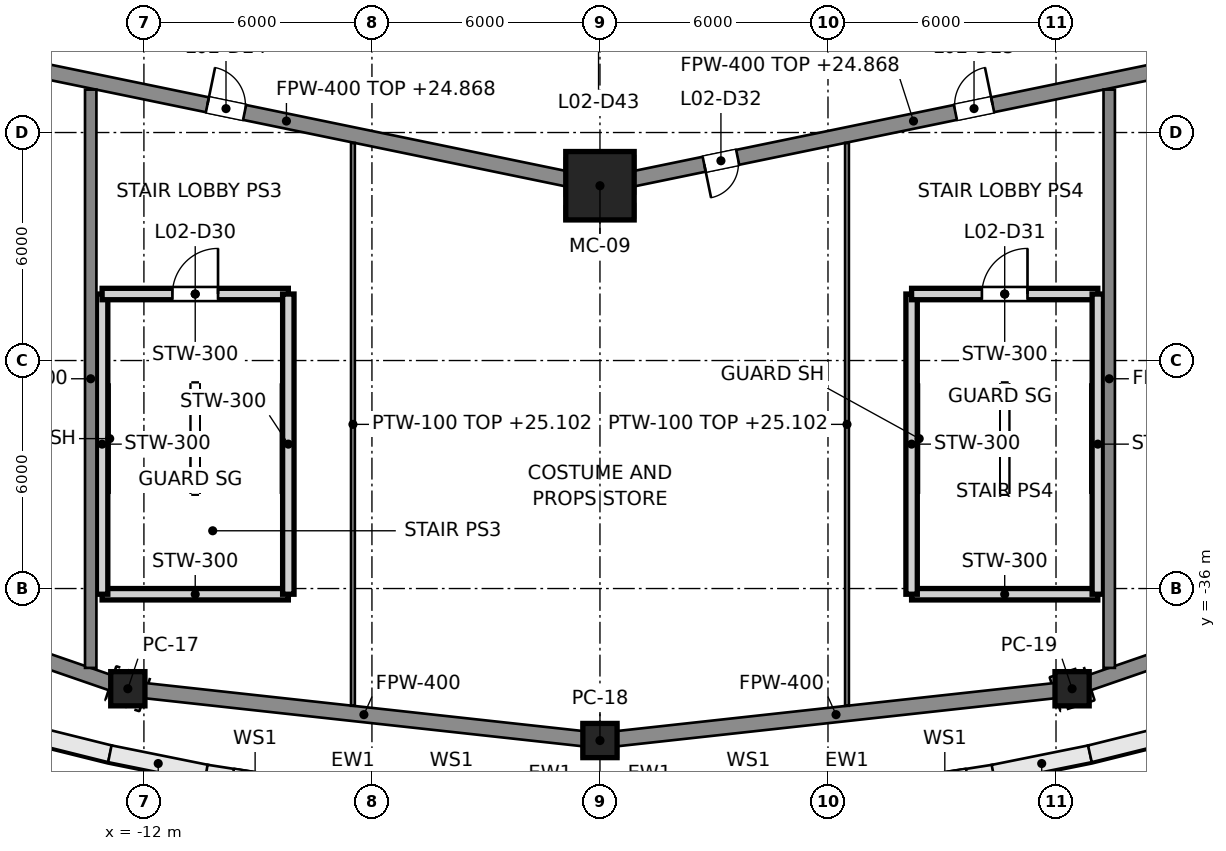
"""IFC4 building model, lengths in metres.
Left out: names, types, materials, properties, quantities, classifications, styles, units other than length and angle.
Written with IfcOpenShell. Run it as: python <this file> out.ifc"""

import sys

from ifc_helpers import new_model, si_unit, direction, frame, frame_2d, origin, origin_2d, place, context, subcontext, project, spatial, polyline, rectangle, hollow_rectangle, outline, extrude, element, fill, save


model = new_model("IFC4")
c1 = context("Model", 3, precision=1e-05, world=origin(), true_north=direction((0.0, 1.0)))
c2 = subcontext(c1, "Body", "Model", "MODEL_VIEW")
j1 = project(units=[si_unit("LENGTHUNIT", "METRE"), si_unit("PLANEANGLEUNIT", "RADIAN")], contexts=[c1])
p1 = place(None, origin())
s1 = spatial("IfcSite", under=j1, at=p1, CompositionType="ELEMENT")
p2 = place(p1, origin())
s2 = spatial("IfcBuilding", under=s1, at=p2, CompositionType="ELEMENT")
p3 = place(p2, frame((0.0, 0.0, 17.0)))
s3 = spatial("IfcBuildingStorey", under=s2, at=p3, CompositionType="ELEMENT", Elevation=17.0)
p4 = place(p3, frame((0.0, -25.4, 0.0), z_axis=(0.0, 0.0, 1.0), x_axis=(0.0, -1.0, 0.0)))
e1 = element("IfcColumn", 1, at=p4, inside=s3, PredefinedType="COLUMN", context=c2, shape_type="SweptSolid", body=[
    extrude(hollow_rectangle(XDim=1.8, YDim=1.8, WallThickness=0.08, at=origin_2d()), origin(), (0.0, 0.0, 1.0), 9.0),
])
for number, where, z_axis, x_axis in (
    (2, (-12.423, -38.637, 0.0), (0.0, 0.0, 1.0), (-0.306, -0.952, 0.0)),
    (3, (0.0, -40.0, 0.0), (0.0, 0.0, 1.0), (0.0, -1.0, 0.0)),
    (4, (12.423, -38.637, 0.0), (0.0, 0.0, 1.0), (0.306, -0.952, 0.0)),
):
    element("IfcColumn", number, at=place(p3, frame(where, z_axis=z_axis, x_axis=x_axis)), inside=s3, PredefinedType="COLUMN", context=c2, shape_type="SweptSolid", body=[
        extrude(hollow_rectangle(XDim=0.9, YDim=0.9, WallThickness=0.04, at=origin_2d()), origin(), (0.0, 0.0, 1.0), 9.0),
    ])
p5 = place(p3, origin())
e5 = element("IfcWall", 5, at=p5, inside=s3, PredefinedType="SOLIDWALL", context=c2, shape_type="SweptSolid", body=[
    extrude(outline(polyline([(-25.0, -36.373), (-22.699, -37.422), (-20.337, -38.369), (-17.918, -39.21), (-15.451, -39.944), (-12.941, -40.569), (-12.842, -40.13), (-15.332, -39.51), (-17.78, -38.782), (-20.179, -37.948), (-22.522, -37.009), (-24.804, -35.968), (-25.0, -36.373)])), origin(), (0.0, 0.0, 1.0), 8.8),
])
p6 = place(p3, frame((-12.896, -40.348, 0.0), z_axis=(0.0, 0.0, 1.0), x_axis=(0.980275735323, -0.197634720473, 0.0)))
e6 = element("IfcWall", 6, at=p6, inside=s3, PredefinedType="SOLIDWALL", context=c2, shape_type="SweptSolid", body=[
    extrude(rectangle(XDim=2.597, YDim=0.45, at=frame_2d((1.298, 0.0))), origin(), (0.0, 0.0, 1.0), 8.8),
])
p7 = place(p3, frame((-10.361, -40.86, 0.0), z_axis=(0.0, 0.0, 1.0), x_axis=(0.98810254681, -0.153796479115, 0.0)))
e7 = element("IfcWall", 7, at=p7, inside=s3, PredefinedType="SOLIDWALL", context=c2, shape_type="SweptSolid", body=[
    extrude(rectangle(XDim=2.605, YDim=0.45, at=frame_2d((1.302, 0.0))), origin(), (0.0, 0.0, 1.0), 8.8),
])
p8 = place(p7, frame((0.702, 0.0, 1.0)))
e8 = element("IfcOpeningElement", 8, at=p8, cuts=e7, PredefinedType="OPENING", context=c2, shape_type="SweptSolid", body=[
    extrude(rectangle(XDim=1.2, YDim=1.8, at=frame_2d((0.6, 0.9))), frame((0.0, 0.225, 0.0), z_axis=(0.0, -1.0, 0.0), x_axis=(1.0, 0.0, 0.0)), (0.0, 0.0, 1.0), 0.45),
])
p9 = place(p3, frame((7.787, -41.26, 0.0), z_axis=(0.0, 0.0, 1.0), x_axis=(0.98810254681, 0.153796479115, 0.0)))
e9 = element("IfcWall", 9, at=p9, inside=s3, PredefinedType="SOLIDWALL", context=c2, shape_type="SweptSolid", body=[
    extrude(rectangle(XDim=2.605, YDim=0.45, at=frame_2d((1.302, 0.0))), origin(), (0.0, 0.0, 1.0), 8.8),
])
p10 = place(p9, frame((0.702, 0.0, 1.0)))
e10 = element("IfcOpeningElement", 10, at=p10, cuts=e9, PredefinedType="OPENING", context=c2, shape_type="SweptSolid", body=[
    extrude(rectangle(XDim=1.2, YDim=1.8, at=frame_2d((0.6, 0.9))), frame((0.0, 0.225, 0.0), z_axis=(0.0, -1.0, 0.0), x_axis=(1.0, 0.0, 0.0)), (0.0, 0.0, 1.0), 0.45),
])
p11 = place(p3, frame((10.351, -40.862, 0.0), z_axis=(0.0, 0.0, 1.0), x_axis=(0.980275735323, 0.197634720473, 0.0)))
e11 = element("IfcWall", 11, at=p11, inside=s3, PredefinedType="SOLIDWALL", context=c2, shape_type="SweptSolid", body=[
    extrude(rectangle(XDim=2.597, YDim=0.45, at=frame_2d((1.298, 0.0))), origin(), (0.0, 0.0, 1.0), 8.8),
])
e12 = element("IfcWall", 12, at=p5, inside=s3, PredefinedType="SOLIDWALL", context=c2, shape_type="SweptSolid", body=[
    extrude(outline(polyline([(12.941, -40.569), (15.451, -39.944), (17.918, -39.21), (20.337, -38.369), (22.699, -37.422), (25.0, -36.373), (24.804, -35.968), (22.522, -37.009), (20.179, -37.948), (17.78, -38.782), (15.332, -39.51), (12.842, -40.13), (12.941, -40.569)])), origin(), (0.0, 0.0, 1.0), 8.8),
])
p12 = place(p3, frame((-8.2, -36.15, 0.0), z_axis=(0.0, 0.0, 1.0), x_axis=(-1.0, 0.0, 0.0)))
e13 = element("IfcWall", 13, at=p12, inside=s3, PredefinedType="SOLIDWALL", context=c2, shape_type="SweptSolid", body=[
    extrude(rectangle(XDim=4.9, YDim=0.3, at=frame_2d((2.45, 0.0))), origin(), (0.0, 0.0, 1.0), 8.8),
])
p13 = place(p3, frame((-13.1, -36.15, 0.0), z_axis=(0.0, 0.0, 1.0), x_axis=(0.0, 1.0, 0.0)))
e14 = element("IfcWall", 14, at=p13, inside=s3, PredefinedType="SOLIDWALL", context=c2, shape_type="SweptSolid", body=[
    extrude(rectangle(XDim=7.9, YDim=0.3, at=frame_2d((3.95, 0.0))), origin(), (0.0, 0.0, 1.0), 8.8),
])
p14 = place(p3, frame((-13.1, -28.25, 0.0), z_axis=(0.0, 0.0, 1.0), x_axis=(1.0, 0.0, 0.0)))
e15 = element("IfcWall", 15, at=p14, inside=s3, PredefinedType="SOLIDWALL", context=c2, shape_type="SweptSolid", body=[
    extrude(rectangle(XDim=4.9, YDim=0.3, at=frame_2d((2.45, 0.0))), origin(), (0.0, 0.0, 1.0), 8.8),
])
p15 = place(p14, frame((1.85, 0.0, 0.0)))
e16 = element("IfcOpeningElement", 16, at=p15, cuts=e15, PredefinedType="OPENING", context=c2, shape_type="SweptSolid", body=[
    extrude(rectangle(XDim=1.2, YDim=2.1, at=frame_2d((0.6, 1.05))), frame((0.0, 0.15, 0.0), z_axis=(0.0, -1.0, 0.0), x_axis=(1.0, 0.0, 0.0)), (0.0, 0.0, 1.0), 0.3),
])
p16 = place(p3, frame((-8.2, -28.25, 0.0), z_axis=(0.0, 0.0, 1.0), x_axis=(0.0, -1.0, 0.0)))
e17 = element("IfcWall", 17, at=p16, inside=s3, PredefinedType="SOLIDWALL", context=c2, shape_type="SweptSolid", body=[
    extrude(rectangle(XDim=7.9, YDim=0.3, at=frame_2d((3.95, 0.0))), origin(), (0.0, 0.0, 1.0), 8.8),
])
p17 = place(p3, frame((13.1, -36.15, 0.0), z_axis=(0.0, 0.0, 1.0), x_axis=(-1.0, 0.0, 0.0)))
e18 = element("IfcWall", 18, at=p17, inside=s3, PredefinedType="SOLIDWALL", context=c2, shape_type="SweptSolid", body=[
    extrude(rectangle(XDim=4.9, YDim=0.3, at=frame_2d((2.45, 0.0))), origin(), (0.0, 0.0, 1.0), 8.8),
])
p18 = place(p3, frame((8.2, -36.15, 0.0), z_axis=(0.0, 0.0, 1.0), x_axis=(0.0, 1.0, 0.0)))
e19 = element("IfcWall", 19, at=p18, inside=s3, PredefinedType="SOLIDWALL", context=c2, shape_type="SweptSolid", body=[
    extrude(rectangle(XDim=7.9, YDim=0.3, at=frame_2d((3.95, 0.0))), origin(), (0.0, 0.0, 1.0), 8.8),
])
p19 = place(p3, frame((8.2, -28.25, 0.0), z_axis=(0.0, 0.0, 1.0), x_axis=(1.0, 0.0, 0.0)))
e20 = element("IfcWall", 20, at=p19, inside=s3, PredefinedType="SOLIDWALL", context=c2, shape_type="SweptSolid", body=[
    extrude(rectangle(XDim=4.9, YDim=0.3, at=frame_2d((2.45, 0.0))), origin(), (0.0, 0.0, 1.0), 8.8),
])
p20 = place(p19, frame((1.85, 0.0, 0.0)))
e21 = element("IfcOpeningElement", 21, at=p20, cuts=e20, PredefinedType="OPENING", context=c2, shape_type="SweptSolid", body=[
    extrude(rectangle(XDim=1.2, YDim=2.1, at=frame_2d((0.6, 1.05))), frame((0.0, 0.15, 0.0), z_axis=(0.0, -1.0, 0.0), x_axis=(1.0, 0.0, 0.0)), (0.0, 0.0, 1.0), 0.3),
])
p21 = place(p3, frame((13.1, -28.25, 0.0), z_axis=(0.0, 0.0, 1.0), x_axis=(0.0, -1.0, 0.0)))
e22 = element("IfcWall", 22, at=p21, inside=s3, PredefinedType="SOLIDWALL", context=c2, shape_type="SweptSolid", body=[
    extrude(rectangle(XDim=7.9, YDim=0.3, at=frame_2d((3.95, 0.0))), origin(), (0.0, 0.0, 1.0), 8.8),
])
p22 = place(p3, frame((-24.0, -34.641, 0.0), z_axis=(0.0, 0.0, 1.0), x_axis=(0.94527485301, -0.326275117449, 0.0)))
e23 = element("IfcWall", 23, at=p22, inside=s3, PredefinedType="PARTITIONING", context=c2, shape_type="SweptSolid", body=[
    extrude(rectangle(XDim=12.247, YDim=0.4, at=frame_2d((6.124, 0.0))), origin(), (0.0, 0.0, 1.0), 7.877),
])
for number, where, z_axis, x_axis in (
    (24, (-12.423, -38.637, 0.0), (0.0, 0.0, 1.0), (0.994, -0.109, 0.0)),
    (25, (0.0, -40.0, 0.0), (0.0, 0.0, 1.0), (0.994, 0.109, 0.0)),
):
    element("IfcWall", number, at=place(p3, frame(where, z_axis=z_axis, x_axis=x_axis)), inside=s3, PredefinedType="PARTITIONING", context=c2, shape_type="SweptSolid", body=[
        extrude(rectangle(XDim=12.498, YDim=0.4, at=frame_2d((6.249, 0.0))), origin(), (0.0, 0.0, 1.0), 7.877),
    ])
p23 = place(p3, frame((12.423, -38.637, 0.0), z_axis=(0.0, 0.0, 1.0), x_axis=(0.94527485301, 0.326275117449, 0.0)))
e26 = element("IfcWall", 26, at=p23, inside=s3, PredefinedType="PARTITIONING", context=c2, shape_type="SweptSolid", body=[
    extrude(rectangle(XDim=12.247, YDim=0.4, at=frame_2d((6.124, 0.0))), origin(), (0.0, 0.0, 1.0), 7.877),
])
p24 = place(p3, frame((-16.5, -21.997, 0.0), z_axis=(0.0, 0.0, 1.0), x_axis=(0.979389305257, -0.201981654484, 0.0)))
e27 = element("IfcWall", 27, at=p24, inside=s3, PredefinedType="PARTITIONING", context=c2, shape_type="SweptSolid", body=[
    extrude(rectangle(XDim=16.847, YDim=0.4, at=frame_2d((8.424, 0.0))), origin(), (0.0, 0.0, 1.0), 7.868),
])
p25 = place(p24, frame((6.3, 0.0, 0.0)))
e28 = element("IfcOpeningElement", 28, at=p25, cuts=e27, PredefinedType="OPENING", context=c2, shape_type="SweptSolid", body=[
    extrude(rectangle(XDim=1.0, YDim=2.1, at=frame_2d((0.5, 1.05))), frame((0.0, 0.2, 0.0), z_axis=(0.0, -1.0, 0.0), x_axis=(1.0, 0.0, 0.0)), (0.0, 0.0, 1.0), 0.4),
])
p26 = place(p3, frame((0.0, -25.4, 0.0), z_axis=(0.0, 0.0, 1.0), x_axis=(0.979389305257, 0.201981654484, 0.0)))
e29 = element("IfcWall", 29, at=p26, inside=s3, PredefinedType="PARTITIONING", context=c2, shape_type="SweptSolid", body=[
    extrude(rectangle(XDim=16.847, YDim=0.4, at=frame_2d((8.424, 0.0))), origin(), (0.0, 0.0, 1.0), 7.868),
])
p27 = place(p26, frame((9.55, 0.0, 0.0)))
e30 = element("IfcOpeningElement", 30, at=p27, cuts=e29, PredefinedType="OPENING", context=c2, shape_type="SweptSolid", body=[
    extrude(rectangle(XDim=1.0, YDim=2.1, at=frame_2d((0.5, 1.05))), frame((0.0, 0.2, 0.0), z_axis=(0.0, -1.0, 0.0), x_axis=(1.0, 0.0, 0.0)), (0.0, 0.0, 1.0), 0.4),
])
p28 = place(p26, frame((2.8, 0.0, 0.0)))
e31 = element("IfcOpeningElement", 31, at=p28, cuts=e29, PredefinedType="OPENING", context=c2, shape_type="SweptSolid", body=[
    extrude(rectangle(XDim=0.9, YDim=2.1, at=frame_2d((0.45, 1.05))), frame((0.0, 0.2, 0.0), z_axis=(0.0, -1.0, 0.0), x_axis=(1.0, 0.0, 0.0)), (0.0, 0.0, 1.0), 0.4),
])
for number, where, z_axis, x_axis in (
    (32, (13.4, -22.872, 0.0), (0.0, 0.0, 1.0), (0.0, -1.0, 0.0)),
    (33, (-13.4, -22.872, 0.0), (0.0, 0.0, 1.0), (0.0, -1.0, 0.0)),
):
    element("IfcWall", number, at=place(p3, frame(where, z_axis=z_axis, x_axis=x_axis)), inside=s3, PredefinedType="PARTITIONING", context=c2, shape_type="SweptSolid", body=[
        extrude(rectangle(XDim=15.217, YDim=0.3, at=frame_2d((7.608, 0.0))), origin(), (0.0, 0.0, 1.0), 8.026),
    ])
for number, where, z_axis, x_axis in (
    (34, (6.5, -24.274, 0.0), (0.0, 0.0, 1.0), (0.0, -1.0, 0.0)),
    (35, (-6.5, -24.274, 0.0), (0.0, 0.0, 1.0), (0.0, -1.0, 0.0)),
):
    element("IfcWall", number, at=place(p3, frame(where, z_axis=z_axis, x_axis=x_axis)), inside=s3, PredefinedType="PARTITIONING", context=c2, shape_type="SweptSolid", body=[
        extrude(rectangle(XDim=14.812, YDim=0.1, at=frame_2d((7.406, 0.0))), origin(), (0.0, 0.0, 1.0), 8.102),
    ])
p29 = place(p25, origin())
e36 = element("IfcDoor", 36, at=p29, inside=s3, OperationType="SINGLE_SWING_LEFT", PredefinedType="DOOR", context=c2, shape_type="SweptSolid", body=[
    extrude(rectangle(XDim=1.0, YDim=2.1, at=frame_2d((0.5, 1.05))), frame((0.0, 0.025, 0.0), z_axis=(0.0, -1.0, 0.0), x_axis=(1.0, 0.0, 0.0)), (0.0, 0.0, 1.0), 0.05),
])
fill(e28, e36)
p30 = place(p27, origin())
e37 = element("IfcDoor", 37, at=p30, inside=s3, OperationType="SINGLE_SWING_RIGHT", PredefinedType="DOOR", context=c2, shape_type="SweptSolid", body=[
    extrude(rectangle(XDim=1.0, YDim=2.1, at=frame_2d((0.5, 1.05))), frame((0.0, 0.025, 0.0), z_axis=(0.0, -1.0, 0.0), x_axis=(1.0, 0.0, 0.0)), (0.0, 0.0, 1.0), 0.05),
])
fill(e30, e37)
p31 = place(p15, origin())
e38 = element("IfcDoor", 38, at=p31, inside=s3, OperationType="SINGLE_SWING_RIGHT", PredefinedType="DOOR", context=c2, shape_type="SweptSolid", body=[
    extrude(rectangle(XDim=1.2, YDim=2.1, at=frame_2d((0.6, 1.05))), frame((0.0, 0.025, 0.0), z_axis=(0.0, -1.0, 0.0), x_axis=(1.0, 0.0, 0.0)), (0.0, 0.0, 1.0), 0.05),
])
fill(e16, e38)
p32 = place(p20, origin())
e39 = element("IfcDoor", 39, at=p32, inside=s3, OperationType="SINGLE_SWING_RIGHT", PredefinedType="DOOR", context=c2, shape_type="SweptSolid", body=[
    extrude(rectangle(XDim=1.2, YDim=2.1, at=frame_2d((0.6, 1.05))), frame((0.0, 0.025, 0.0), z_axis=(0.0, -1.0, 0.0), x_axis=(1.0, 0.0, 0.0)), (0.0, 0.0, 1.0), 0.05),
])
fill(e21, e39)
p33 = place(p28, origin())
e40 = element("IfcDoor", 40, at=p33, inside=s3, OperationType="SINGLE_SWING_LEFT", PredefinedType="DOOR", context=c2, shape_type="SweptSolid", body=[
    extrude(rectangle(XDim=0.9, YDim=2.1, at=frame_2d((0.45, 1.05))), frame((0.0, 0.025, 0.0), z_axis=(0.0, -1.0, 0.0), x_axis=(1.0, 0.0, 0.0)), (0.0, 0.0, 1.0), 0.05),
])
fill(e31, e40)
save(model, sys.argv[1])
